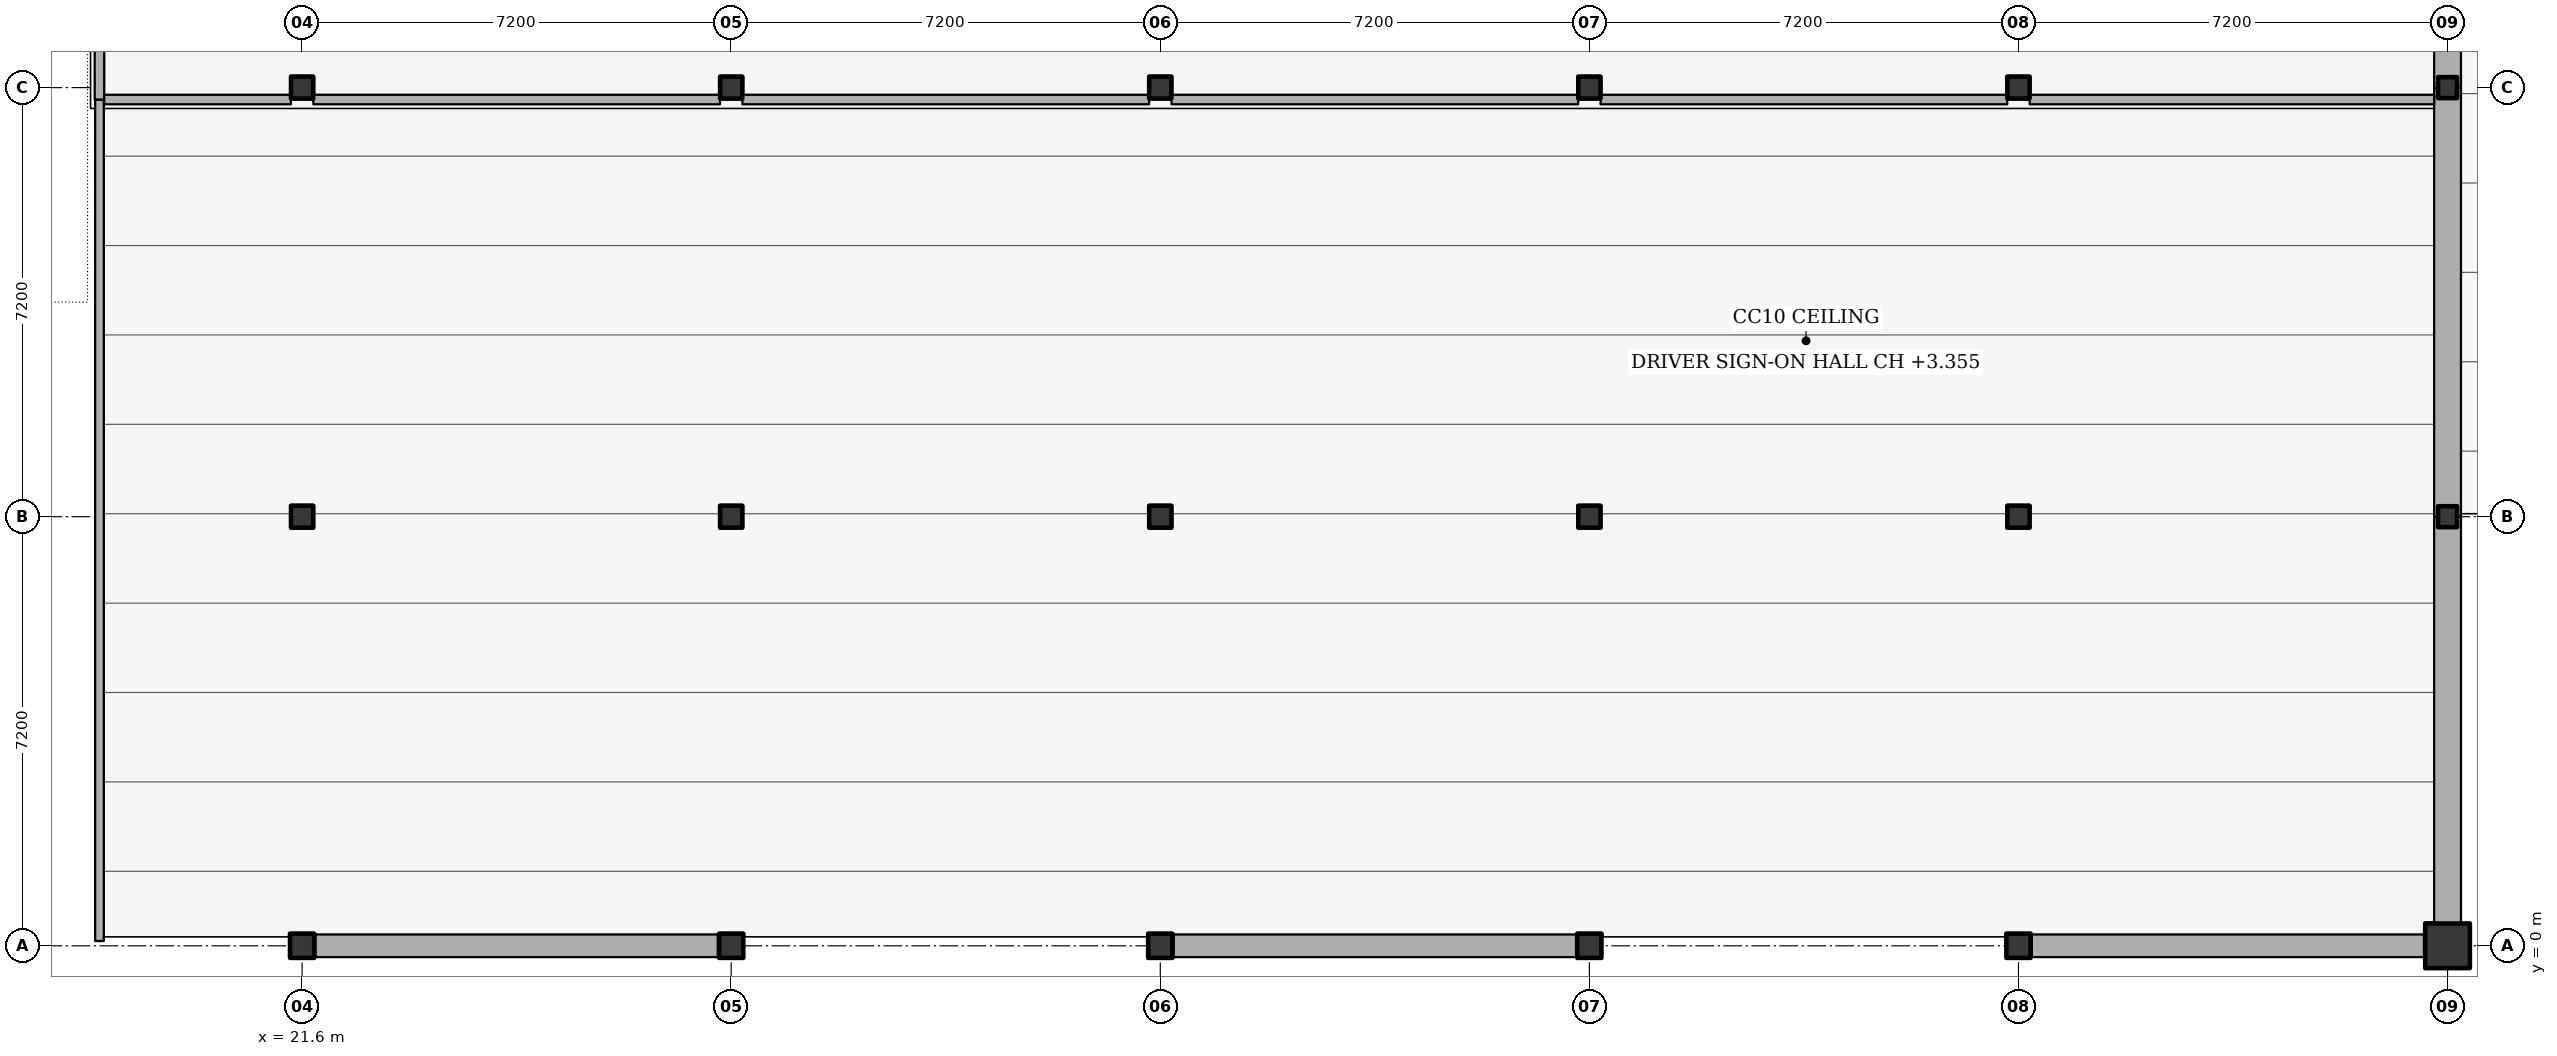
"""IFC4 building model, lengths in metres.
Left out: names, types, materials, properties, quantities, classifications, styles, units other than length and angle.
Written with IfcOpenShell. Run it as: python <this file> out.ifc"""

import sys

from ifc_helpers import new_model, si_unit, direction, frame, frame_2d, origin, origin_2d, place, context, subcontext, project, spatial, rectangle, hollow_circle, i_section, extrude, element, fill, save


model = new_model("IFC4")
c1 = context("Model", 3, precision=1e-05, world=origin(), true_north=direction((0.0, 1.0)))
c2 = subcontext(c1, "Body", "Model", "MODEL_VIEW")
j1 = project(units=[si_unit("LENGTHUNIT", "METRE"), si_unit("PLANEANGLEUNIT", "RADIAN")], contexts=[c1])
p1 = place(None, origin())
s1 = spatial("IfcSite", under=j1, at=p1, CompositionType="ELEMENT")
p2 = place(p1, origin())
s2 = spatial("IfcBuilding", under=s1, at=p2, CompositionType="ELEMENT")
p3 = place(p2, origin())
s3 = spatial("IfcBuildingStorey", under=s2, at=p3, CompositionType="ELEMENT", Elevation=0.0)
p4 = place(p3, frame((21.6, 0.0, -0.3), z_axis=(0.0, 0.0, 1.0), x_axis=(1.0, 0.0, 0.0)))
e1 = element("IfcColumn", 1, at=p4, inside=s3, PredefinedType="COLUMN", context=c2, shape_type="SweptSolid", body=[
    extrude(hollow_circle(Radius=0.203, WallThickness=0.016, at=origin_2d()), origin(), (0.0, 0.0, 1.0), 5.7),
])
for number, where, z_axis, x_axis in (
    (2, (21.6, 7.2, -0.3), (0.0, 0.0, 1.0), (1.0, 0.0, 0.0)),
    (3, (21.6, 14.4, -0.3), (0.0, 0.0, 1.0), (1.0, 0.0, 0.0)),
):
    element("IfcColumn", number, at=place(p3, frame(where, z_axis=z_axis, x_axis=x_axis)), inside=s3, PredefinedType="COLUMN", context=c2, shape_type="SweptSolid", body=[
        extrude(i_section(OverallWidth=0.373, OverallDepth=0.368, WebThickness=0.014, FlangeThickness=0.024, FilletRadius=0.015, at=origin_2d()), origin(), (0.0, 0.0, 1.0), 5.7),
    ])
p5 = place(p3, frame((28.8, 0.0, -0.3), z_axis=(0.0, 0.0, 1.0), x_axis=(1.0, 0.0, 0.0)))
e4 = element("IfcColumn", 4, at=p5, inside=s3, PredefinedType="COLUMN", context=c2, shape_type="SweptSolid", body=[
    extrude(hollow_circle(Radius=0.203, WallThickness=0.016, at=origin_2d()), origin(), (0.0, 0.0, 1.0), 5.7),
])
for number, where, z_axis, x_axis in (
    (5, (28.8, 7.2, -0.3), (0.0, 0.0, 1.0), (1.0, 0.0, 0.0)),
    (6, (28.8, 14.4, -0.3), (0.0, 0.0, 1.0), (1.0, 0.0, 0.0)),
):
    element("IfcColumn", number, at=place(p3, frame(where, z_axis=z_axis, x_axis=x_axis)), inside=s3, PredefinedType="COLUMN", context=c2, shape_type="SweptSolid", body=[
        extrude(i_section(OverallWidth=0.373, OverallDepth=0.368, WebThickness=0.014, FlangeThickness=0.024, FilletRadius=0.015, at=origin_2d()), origin(), (0.0, 0.0, 1.0), 5.7),
    ])
p6 = place(p3, frame((36.0, 0.0, -0.3), z_axis=(0.0, 0.0, 1.0), x_axis=(1.0, 0.0, 0.0)))
e7 = element("IfcColumn", 7, at=p6, inside=s3, PredefinedType="COLUMN", context=c2, shape_type="SweptSolid", body=[
    extrude(hollow_circle(Radius=0.203, WallThickness=0.016, at=origin_2d()), origin(), (0.0, 0.0, 1.0), 5.7),
])
for number, where, z_axis, x_axis in (
    (8, (36.0, 7.2, -0.3), (0.0, 0.0, 1.0), (1.0, 0.0, 0.0)),
    (9, (36.0, 14.4, -0.3), (0.0, 0.0, 1.0), (1.0, 0.0, 0.0)),
):
    element("IfcColumn", number, at=place(p3, frame(where, z_axis=z_axis, x_axis=x_axis)), inside=s3, PredefinedType="COLUMN", context=c2, shape_type="SweptSolid", body=[
        extrude(i_section(OverallWidth=0.373, OverallDepth=0.368, WebThickness=0.014, FlangeThickness=0.024, FilletRadius=0.015, at=origin_2d()), origin(), (0.0, 0.0, 1.0), 5.7),
    ])
p7 = place(p3, frame((43.2, 0.0, -0.3), z_axis=(0.0, 0.0, 1.0), x_axis=(1.0, 0.0, 0.0)))
e10 = element("IfcColumn", 10, at=p7, inside=s3, PredefinedType="COLUMN", context=c2, shape_type="SweptSolid", body=[
    extrude(hollow_circle(Radius=0.203, WallThickness=0.016, at=origin_2d()), origin(), (0.0, 0.0, 1.0), 5.7),
])
for number, where, z_axis, x_axis in (
    (11, (43.2, 7.2, -0.3), (0.0, 0.0, 1.0), (1.0, 0.0, 0.0)),
    (12, (43.2, 14.4, -0.3), (0.0, 0.0, 1.0), (1.0, 0.0, 0.0)),
):
    element("IfcColumn", number, at=place(p3, frame(where, z_axis=z_axis, x_axis=x_axis)), inside=s3, PredefinedType="COLUMN", context=c2, shape_type="SweptSolid", body=[
        extrude(i_section(OverallWidth=0.373, OverallDepth=0.368, WebThickness=0.014, FlangeThickness=0.024, FilletRadius=0.015, at=origin_2d()), origin(), (0.0, 0.0, 1.0), 5.7),
    ])
p8 = place(p3, frame((50.4, 0.0, -0.3), z_axis=(0.0, 0.0, 1.0), x_axis=(1.0, 0.0, 0.0)))
e13 = element("IfcColumn", 13, at=p8, inside=s3, PredefinedType="COLUMN", context=c2, shape_type="SweptSolid", body=[
    extrude(hollow_circle(Radius=0.203, WallThickness=0.016, at=origin_2d()), origin(), (0.0, 0.0, 1.0), 5.7),
])
for number, where, z_axis, x_axis in (
    (14, (50.4, 7.2, -0.3), (0.0, 0.0, 1.0), (1.0, 0.0, 0.0)),
    (15, (50.4, 14.4, -0.3), (0.0, 0.0, 1.0), (1.0, 0.0, 0.0)),
):
    element("IfcColumn", number, at=place(p3, frame(where, z_axis=z_axis, x_axis=x_axis)), inside=s3, PredefinedType="COLUMN", context=c2, shape_type="SweptSolid", body=[
        extrude(i_section(OverallWidth=0.373, OverallDepth=0.368, WebThickness=0.014, FlangeThickness=0.024, FilletRadius=0.015, at=origin_2d()), origin(), (0.0, 0.0, 1.0), 5.7),
    ])
p9 = place(p3, frame((57.6, 0.0, -0.3), z_axis=(0.0, 0.0, 1.0), x_axis=(1.0, 0.0, 0.0)))
e16 = element("IfcColumn", 16, at=p9, inside=s3, PredefinedType="COLUMN", context=c2, shape_type="SweptSolid", body=[
    extrude(rectangle(XDim=0.75, YDim=0.75, at=origin_2d()), origin(), (0.0, 0.0, 1.0), 5.7),
])
for number, where, z_axis, x_axis in (
    (17, (57.6, 7.2, -0.3), (0.0, 0.0, 1.0), (1.0, 0.0, 0.0)),
    (18, (57.6, 14.4, -0.3), (0.0, 0.0, 1.0), (1.0, 0.0, 0.0)),
):
    element("IfcColumn", number, at=place(p3, frame(where, z_axis=z_axis, x_axis=x_axis)), inside=s3, PredefinedType="COLUMN", context=c2, shape_type="SweptSolid", body=[
        extrude(i_section(OverallWidth=0.318, OverallDepth=0.353, WebThickness=0.023, FlangeThickness=0.038, FilletRadius=0.015, at=origin_2d()), origin(), (0.0, 0.0, 1.0), 5.7),
    ])
p10 = place(p3, frame((57.205, 0.0, 0.0), z_axis=(0.0, 0.0, 1.0), x_axis=(-1.0, 0.0, 0.0)))
e19 = element("IfcWall", 19, at=p10, inside=s3, PredefinedType="SOLIDWALL", context=c2, shape_type="SweptSolid", body=[
    extrude(rectangle(XDim=6.582, YDim=0.38, at=frame_2d((3.291, 0.0))), origin(), (0.0, 0.0, 1.0), 4.65),
])
p11 = place(p3, frame((42.977, 0.0, 0.0), z_axis=(0.0, 0.0, 1.0), x_axis=(-1.0, 0.0, 0.0)))
e20 = element("IfcWall", 20, at=p11, inside=s3, PredefinedType="SOLIDWALL", context=c2, shape_type="SweptSolid", body=[
    extrude(rectangle(XDim=6.754, YDim=0.38, at=frame_2d((3.377, 0.0))), origin(), (0.0, 0.0, 1.0), 4.65),
])
p12 = place(p3, frame((28.577, 0.0, 0.0), z_axis=(0.0, 0.0, 1.0), x_axis=(-1.0, 0.0, 0.0)))
e21 = element("IfcWall", 21, at=p12, inside=s3, PredefinedType="SOLIDWALL", context=c2, shape_type="SweptSolid", body=[
    extrude(rectangle(XDim=6.754, YDim=0.38, at=frame_2d((3.377, 0.0))), origin(), (0.0, 0.0, 1.0), 4.65),
])
p13 = place(p12, frame((2.477, 0.0, 0.0)))
e22 = element("IfcOpeningElement", 22, at=p13, cuts=e21, PredefinedType="OPENING", context=c2, shape_type="SweptSolid", body=[
    extrude(rectangle(XDim=1.8, YDim=2.2, at=frame_2d((0.9, 1.1))), frame((0.0, 0.2, 0.0), z_axis=(0.0, -1.0, 0.0), x_axis=(1.0, 0.0, 0.0)), (0.0, 0.0, 1.0), 0.4),
])
p14 = place(p3, frame((57.6, 0.375, 0.0), z_axis=(0.0, 0.0, 1.0), x_axis=(0.0, 1.0, 0.0)))
e23 = element("IfcWall", 23, at=p14, inside=s3, PredefinedType="SOLIDWALL", context=c2, shape_type="SweptSolid", body=[
    extrude(rectangle(XDim=6.825, YDim=0.45, at=frame_2d((3.413, 0.0))), origin(), (0.0, 0.0, 1.0), 4.594),
])
p15 = place(p3, frame((57.6, 7.2, 0.0), z_axis=(0.0, 0.0, 1.0), x_axis=(0.0, 1.0, 0.0)))
e24 = element("IfcWall", 24, at=p15, inside=s3, PredefinedType="SOLIDWALL", context=c2, shape_type="SweptSolid", body=[
    extrude(rectangle(XDim=7.2, YDim=0.45, at=frame_2d((3.6, 0.0))), origin(), (0.0, 0.0, 1.0), 4.594),
])
p16 = place(p3, frame((57.6, 14.4, 0.0), z_axis=(0.0, 0.0, 1.0), x_axis=(0.0, 1.0, 0.0)))
e25 = element("IfcWall", 25, at=p16, inside=s3, PredefinedType="SOLIDWALL", context=c2, shape_type="SweptSolid", body=[
    extrude(rectangle(XDim=7.2, YDim=0.45, at=frame_2d((3.6, 0.0))), origin(), (0.0, 0.0, 1.0), 4.594),
])
p17 = place(p16, frame((4.8, 0.0, 0.0)))
e26 = element("IfcOpeningElement", 26, at=p17, cuts=e25, PredefinedType="OPENING", context=c2, shape_type="SweptSolid", body=[
    extrude(rectangle(XDim=1.4, YDim=2.15, at=frame_2d((0.7, 1.075))), frame((0.0, 0.235, 0.0), z_axis=(0.0, -1.0, 0.0), x_axis=(1.0, 0.0, 0.0)), (0.0, 0.0, 1.0), 0.47),
])
p18 = place(p3, frame((18.2, 0.08, 0.0), z_axis=(0.0, 0.0, 1.0), x_axis=(0.0, 1.0, 0.0)))
e27 = element("IfcWall", 27, at=p18, inside=s3, PredefinedType="PARTITIONING", context=c2, shape_type="SweptSolid", body=[
    extrude(rectangle(XDim=14.12, YDim=0.145, at=frame_2d((7.06, 0.0))), origin(), (0.0, 0.0, 1.0), 3.55),
])
p19 = place(p18, frame((10.84, 0.0, 0.0)))
e28 = element("IfcOpeningElement", 28, at=p19, cuts=e27, PredefinedType="OPENING", context=c2, shape_type="SweptSolid", body=[
    extrude(rectangle(XDim=1.22, YDim=2.16, at=frame_2d((0.61, 1.08))), frame((0.0, 0.083, 0.0), z_axis=(0.0, -1.0, 0.0), x_axis=(1.0, 0.0, 0.0)), (0.0, 0.0, 1.0), 0.165),
])
p20 = place(p3, frame((18.2, 14.2, 0.0), z_axis=(0.0, 0.0, 1.0), x_axis=(0.0, 1.0, 0.0)))
e29 = element("IfcWall", 29, at=p20, inside=s3, PredefinedType="PARTITIONING", context=c2, shape_type="SweptSolid", body=[
    extrude(rectangle(XDim=14.4, YDim=0.16, at=frame_2d((7.2, 0.0))), origin(), (0.0, 0.0, 1.0), 3.55),
])
p21 = place(p20, frame((3.41, 0.0, 0.0)))
e30 = element("IfcOpeningElement", 30, at=p21, cuts=e29, PredefinedType="OPENING", context=c2, shape_type="SweptSolid", body=[
    extrude(rectangle(XDim=1.4, YDim=2.15, at=frame_2d((0.7, 1.075))), frame((0.0, 0.09, 0.0), z_axis=(0.0, -1.0, 0.0), x_axis=(1.0, 0.0, 0.0)), (0.0, 0.0, 1.0), 0.18),
])
p22 = place(p3, frame((18.28, 14.2, 0.0), z_axis=(0.0, 0.0, 1.0), x_axis=(1.0, 0.0, 0.0)))
e31 = element("IfcWall", 31, at=p22, inside=s3, PredefinedType="PARTITIONING", context=c2, shape_type="SweptSolid", body=[
    extrude(rectangle(XDim=3.132, YDim=0.16, at=frame_2d((1.566, 0.0))), origin(), (0.0, 0.0, 1.0), 3.55),
])
for number, where, z_axis, x_axis in (
    (32, (21.788, 14.2, 0.0), (0.0, 0.0, 1.0), (1.0, 0.0, 0.0)),
    (33, (28.988, 14.2, 0.0), (0.0, 0.0, 1.0), (1.0, 0.0, 0.0)),
    (34, (36.188, 14.2, 0.0), (0.0, 0.0, 1.0), (1.0, 0.0, 0.0)),
    (35, (43.388, 14.2, 0.0), (0.0, 0.0, 1.0), (1.0, 0.0, 0.0)),
):
    element("IfcWall", number, at=place(p3, frame(where, z_axis=z_axis, x_axis=x_axis)), inside=s3, PredefinedType="PARTITIONING", context=c2, shape_type="SweptSolid", body=[
        extrude(rectangle(XDim=6.824, YDim=0.16, at=frame_2d((3.412, 0.0))), origin(), (0.0, 0.0, 1.0), 3.55),
    ])
p23 = place(p3, frame((50.588, 14.2, 0.0), z_axis=(0.0, 0.0, 1.0), x_axis=(1.0, 0.0, 0.0)))
e36 = element("IfcWall", 36, at=p23, inside=s3, PredefinedType="PARTITIONING", context=c2, shape_type="SweptSolid", body=[
    extrude(rectangle(XDim=6.787, YDim=0.16, at=frame_2d((3.394, 0.0))), origin(), (0.0, 0.0, 1.0), 3.55),
])
p24 = place(p13, origin())
e37 = element("IfcDoor", 37, at=p24, inside=s3, OperationType="DOUBLE_SWING_LEFT", PredefinedType="DOOR", context=c2, shape_type="SweptSolid", body=[
    extrude(rectangle(XDim=1.8, YDim=2.2, at=frame_2d((0.9, 1.1))), frame((0.0, 0.025, 0.0), z_axis=(0.0, -1.0, 0.0), x_axis=(1.0, 0.0, 0.0)), (0.0, 0.0, 1.0), 0.05),
])
fill(e22, e37)
p25 = place(p19, origin())
e38 = element("IfcDoor", 38, at=p25, inside=s3, OperationType="SINGLE_SWING_RIGHT", PredefinedType="DOOR", context=c2, shape_type="SweptSolid", body=[
    extrude(rectangle(XDim=1.22, YDim=2.16, at=frame_2d((0.61, 1.08))), frame((0.0, 0.025, 0.0), z_axis=(0.0, -1.0, 0.0), x_axis=(1.0, 0.0, 0.0)), (0.0, 0.0, 1.0), 0.05),
])
fill(e28, e38)
save(model, sys.argv[1])
